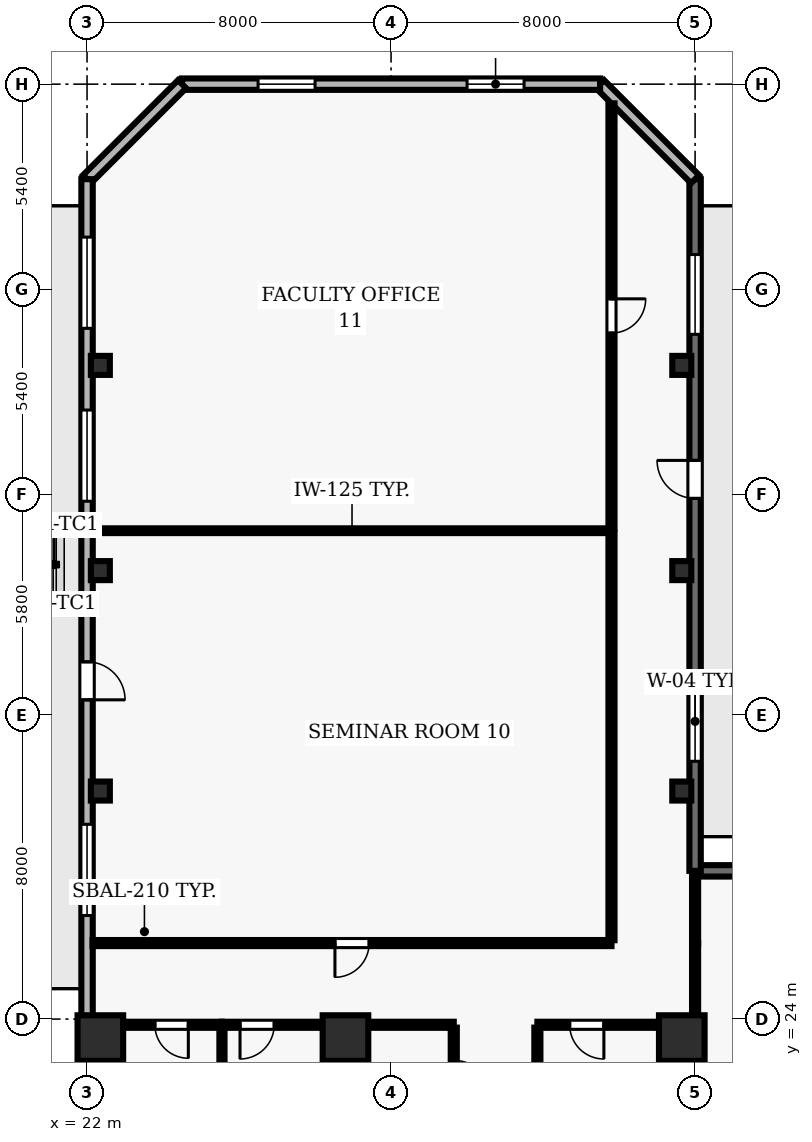
"""IFC4 building model, lengths in metres.
Left out: names, types, materials, properties, quantities, classifications, styles, units other than length and angle.
Written with IfcOpenShell. Run it as: python <this file> out.ifc"""

import sys

from ifc_helpers import new_model, si_unit, direction, frame, frame_2d, origin, origin_2d, place, context, subcontext, project, spatial, rectangle, hollow_rectangle, extrude, element, fill, save


model = new_model("IFC4")
c1 = context("Model", 3, precision=1e-05, world=origin(), true_north=direction((0.0, 1.0)))
c2 = subcontext(c1, "Body", "Model", "MODEL_VIEW")
j1 = project(units=[si_unit("LENGTHUNIT", "METRE"), si_unit("PLANEANGLEUNIT", "RADIAN")], contexts=[c1])
p1 = place(None, origin())
s1 = spatial("IfcSite", under=j1, at=p1, CompositionType="ELEMENT")
p2 = place(p1, origin())
s2 = spatial("IfcBuilding", under=s1, at=p2, CompositionType="ELEMENT")
p3 = place(p2, frame((0.0, 0.0, 130.7)))
s3 = spatial("IfcBuildingStorey", under=s2, at=p3, CompositionType="ELEMENT", Elevation=130.7)
for number, where, z_axis, x_axis in (
    (1, (22.35, 23.5, 0.0), (0.0, 0.0, 1.0), (1.0, 0.0, 0.0)),
    (2, (28.8, 23.5, 0.0), (0.0, 0.0, 1.0), (1.0, 0.0, 0.0)),
    (3, (37.65, 23.5, 0.0), (0.0, 0.0, 1.0), (1.0, 0.0, 0.0)),
):
    element("IfcColumn", number, at=place(p3, frame(where, z_axis=z_axis, x_axis=x_axis)), inside=s3, PredefinedType="COLUMN", context=c2, shape_type="SweptSolid", body=[
        extrude(rectangle(XDim=1.2, YDim=1.2, at=origin_2d()), origin(), (0.0, 0.0, 1.0), 3.9),
    ])
for number, where, z_axis, x_axis in (
    (4, (22.35, 30.0, 0.0), (0.0, 0.0, 1.0), (1.0, 0.0, 0.0)),
    (5, (37.65, 30.0, 0.0), (0.0, 0.0, 1.0), (1.0, 0.0, 0.0)),
    (6, (22.35, 35.8, 0.0), (0.0, 0.0, 1.0), (1.0, 0.0, 0.0)),
    (7, (37.65, 35.8, 0.0), (0.0, 0.0, 1.0), (1.0, 0.0, 0.0)),
    (8, (22.35, 41.2, 0.0), (0.0, 0.0, 1.0), (1.0, 0.0, 0.0)),
    (9, (37.65, 41.2, 0.0), (0.0, 0.0, 1.0), (1.0, 0.0, 0.0)),
):
    element("IfcColumn", number, at=place(p3, frame(where, z_axis=z_axis, x_axis=x_axis)), inside=s3, PredefinedType="COLUMN", context=c2, shape_type="SweptSolid", body=[
        extrude(hollow_rectangle(XDim=0.5, YDim=0.5, WallThickness=0.025, at=origin_2d()), origin(), (0.0, 0.0, 1.0), 3.9),
    ])
p4 = place(p3, frame((46.151, 27.9, 0.0), z_axis=(0.0, 0.0, 1.0), x_axis=(-1.0, 0.0, 0.0)))
e10 = element("IfcWall", 10, at=p4, inside=s3, PredefinedType="SOLIDWALL", context=c2, shape_type="SweptSolid", body=[
    extrude(rectangle(XDim=8.151, YDim=0.3, at=frame_2d((4.075, 0.0))), origin(), (0.0, 0.0, 1.0), 3.69),
])
p5 = place(p4, frame((3.176, 0.0, 0.9)))
e11 = element("IfcOpeningElement", 11, at=p5, cuts=e10, PredefinedType="OPENING", context=c2, shape_type="SweptSolid", body=[
    extrude(rectangle(XDim=1.8, YDim=1.6, at=frame_2d((0.9, 0.8))), frame((0.0, 0.16, 0.0), z_axis=(0.0, -1.0, 0.0), x_axis=(1.0, 0.0, 0.0)), (0.0, 0.0, 1.0), 0.32),
])
p6 = place(p3, frame((38.0, 27.9, 0.0), z_axis=(0.0, 0.0, 1.0), x_axis=(0.0, 1.0, 0.0)))
e12 = element("IfcWall", 12, at=p6, inside=s3, PredefinedType="SOLIDWALL", context=c2, shape_type="SweptSolid", body=[
    extrude(rectangle(XDim=18.2, YDim=0.3, at=frame_2d((9.1, 0.0))), origin(), (0.0, 0.0, 1.0), 3.69),
])
p7 = place(p6, frame((9.8, 0.0, 0.0)))
e13 = element("IfcOpeningElement", 13, at=p7, cuts=e12, PredefinedType="OPENING", context=c2, shape_type="SweptSolid", body=[
    extrude(rectangle(XDim=1.0, YDim=2.2, at=frame_2d((0.5, 1.1))), frame((0.0, 0.16, 0.0), z_axis=(0.0, -1.0, 0.0), x_axis=(1.0, 0.0, 0.0)), (0.0, 0.0, 1.0), 0.32),
])
p8 = place(p6, frame((2.883, 0.0, 0.9)))
e14 = element("IfcOpeningElement", 14, at=p8, cuts=e12, PredefinedType="OPENING", context=c2, shape_type="SweptSolid", body=[
    extrude(rectangle(XDim=2.1, YDim=1.6, at=frame_2d((1.05, 0.8))), frame((0.0, 0.16, 0.0), z_axis=(0.0, -1.0, 0.0), x_axis=(1.0, 0.0, 0.0)), (0.0, 0.0, 1.0), 0.32),
])
p9 = place(p6, frame((14.117, 0.0, 0.9)))
e15 = element("IfcOpeningElement", 15, at=p9, cuts=e12, PredefinedType="OPENING", context=c2, shape_type="SweptSolid", body=[
    extrude(rectangle(XDim=2.1, YDim=1.6, at=frame_2d((1.05, 0.8))), frame((0.0, 0.16, 0.0), z_axis=(0.0, -1.0, 0.0), x_axis=(1.0, 0.0, 0.0)), (0.0, 0.0, 1.0), 0.32),
])
p10 = place(p3, frame((38.0, 46.1, 0.0), z_axis=(0.0, 0.0, 1.0), x_axis=(-0.707106781187, 0.707106781187, 0.0)))
e16 = element("IfcWall", 16, at=p10, inside=s3, PredefinedType="SOLIDWALL", context=c2, shape_type="SweptSolid", body=[
    extrude(rectangle(XDim=3.536, YDim=0.3, at=frame_2d((1.768, 0.0))), origin(), (0.0, 0.0, 1.0), 3.69),
])
p11 = place(p3, frame((35.5, 48.6, 0.0), z_axis=(0.0, 0.0, 1.0), x_axis=(-1.0, 0.0, 0.0)))
e17 = element("IfcWall", 17, at=p11, inside=s3, PredefinedType="SOLIDWALL", context=c2, shape_type="SweptSolid", body=[
    extrude(rectangle(XDim=11.0, YDim=0.3, at=frame_2d((5.5, 0.0))), origin(), (0.0, 0.0, 1.0), 3.69),
])
p12 = place(p11, frame((2.0, 0.0, 0.9)))
e18 = element("IfcOpeningElement", 18, at=p12, cuts=e17, PredefinedType="OPENING", context=c2, shape_type="SweptSolid", body=[
    extrude(rectangle(XDim=1.5, YDim=1.8, at=frame_2d((0.75, 0.9))), frame((0.0, 0.16, 0.0), z_axis=(0.0, -1.0, 0.0), x_axis=(1.0, 0.0, 0.0)), (0.0, 0.0, 1.0), 0.32),
])
p13 = place(p11, frame((7.5, 0.0, 0.9)))
e19 = element("IfcOpeningElement", 19, at=p13, cuts=e17, PredefinedType="OPENING", context=c2, shape_type="SweptSolid", body=[
    extrude(rectangle(XDim=1.5, YDim=1.8, at=frame_2d((0.75, 0.9))), frame((0.0, 0.16, 0.0), z_axis=(0.0, -1.0, 0.0), x_axis=(1.0, 0.0, 0.0)), (0.0, 0.0, 1.0), 0.32),
])
p14 = place(p3, frame((24.5, 48.6, 0.0), z_axis=(0.0, 0.0, 1.0), x_axis=(-0.707106781187, -0.707106781187, 0.0)))
e20 = element("IfcWall", 20, at=p14, inside=s3, PredefinedType="SOLIDWALL", context=c2, shape_type="SweptSolid", body=[
    extrude(rectangle(XDim=3.536, YDim=0.3, at=frame_2d((1.768, 0.0))), origin(), (0.0, 0.0, 1.0), 3.69),
])
p15 = place(p3, frame((22.0, 46.1, 0.0), z_axis=(0.0, 0.0, 1.0), x_axis=(0.0, -1.0, 0.0)))
e21 = element("IfcWall", 21, at=p15, inside=s3, PredefinedType="SOLIDWALL", context=c2, shape_type="SweptSolid", body=[
    extrude(rectangle(XDim=43.6, YDim=0.3, at=frame_2d((21.8, 0.0))), origin(), (0.0, 0.0, 1.0), 3.69),
])
p16 = place(p15, frame((12.7, 0.0, 0.0)))
e22 = element("IfcOpeningElement", 22, at=p16, cuts=e21, PredefinedType="OPENING", context=c2, shape_type="SweptSolid", body=[
    extrude(rectangle(XDim=1.0, YDim=2.2, at=frame_2d((0.5, 1.1))), frame((0.0, 0.16, 0.0), z_axis=(0.0, -1.0, 0.0), x_axis=(1.0, 0.0, 0.0)), (0.0, 0.0, 1.0), 0.32),
])
p17 = place(p15, frame((1.525, 0.0, 0.9)))
e23 = element("IfcOpeningElement", 23, at=p17, cuts=e21, PredefinedType="OPENING", context=c2, shape_type="SweptSolid", body=[
    extrude(rectangle(XDim=2.4, YDim=1.8, at=frame_2d((1.2, 0.9))), frame((0.0, 0.16, 0.0), z_axis=(0.0, -1.0, 0.0), x_axis=(1.0, 0.0, 0.0)), (0.0, 0.0, 1.0), 0.32),
])
p18 = place(p15, frame((6.075, 0.0, 0.9)))
e24 = element("IfcOpeningElement", 24, at=p18, cuts=e21, PredefinedType="OPENING", context=c2, shape_type="SweptSolid", body=[
    extrude(rectangle(XDim=2.4, YDim=1.8, at=frame_2d((1.2, 0.9))), frame((0.0, 0.16, 0.0), z_axis=(0.0, -1.0, 0.0), x_axis=(1.0, 0.0, 0.0)), (0.0, 0.0, 1.0), 0.32),
])
p19 = place(p15, frame((16.975, 0.0, 0.9)))
e25 = element("IfcOpeningElement", 25, at=p19, cuts=e21, PredefinedType="OPENING", context=c2, shape_type="SweptSolid", body=[
    extrude(rectangle(XDim=2.4, YDim=1.8, at=frame_2d((1.2, 0.9))), frame((0.0, 0.16, 0.0), z_axis=(0.0, -1.0, 0.0), x_axis=(1.0, 0.0, 0.0)), (0.0, 0.0, 1.0), 0.32),
])
p20 = place(p15, frame((23.775, 0.0, 0.9)))
e26 = element("IfcOpeningElement", 26, at=p20, cuts=e21, PredefinedType="OPENING", context=c2, shape_type="SweptSolid", body=[
    extrude(rectangle(XDim=2.4, YDim=1.8, at=frame_2d((1.2, 0.9))), frame((0.0, 0.16, 0.0), z_axis=(0.0, -1.0, 0.0), x_axis=(1.0, 0.0, 0.0)), (0.0, 0.0, 1.0), 0.32),
])
p21 = place(p15, frame((27.875, 0.0, 0.9)))
e27 = element("IfcOpeningElement", 27, at=p21, cuts=e21, PredefinedType="OPENING", context=c2, shape_type="SweptSolid", body=[
    extrude(rectangle(XDim=2.4, YDim=1.8, at=frame_2d((1.2, 0.9))), frame((0.0, 0.16, 0.0), z_axis=(0.0, -1.0, 0.0), x_axis=(1.0, 0.0, 0.0)), (0.0, 0.0, 1.0), 0.32),
])
p22 = place(p15, frame((34.225, 0.0, 0.9)))
e28 = element("IfcOpeningElement", 28, at=p22, cuts=e21, PredefinedType="OPENING", context=c2, shape_type="SweptSolid", body=[
    extrude(rectangle(XDim=2.4, YDim=1.8, at=frame_2d((1.2, 0.9))), frame((0.0, 0.16, 0.0), z_axis=(0.0, -1.0, 0.0), x_axis=(1.0, 0.0, 0.0)), (0.0, 0.0, 1.0), 0.32),
])
p23 = place(p3, frame((25.55, 23.85, 0.0), z_axis=(0.0, 0.0, 1.0), x_axis=(-1.0, 0.0, 0.0)))
e29 = element("IfcWall", 29, at=p23, inside=s3, PredefinedType="PARTITIONING", context=c2, shape_type="SweptSolid", body=[
    extrude(rectangle(XDim=3.35, YDim=0.16, at=frame_2d((1.675, 0.0))), origin(), (0.0, 0.0, 1.0), 3.073),
])
p24 = place(p23, frame((0.885, 0.0, 0.0)))
e30 = element("IfcOpeningElement", 30, at=p24, cuts=e29, PredefinedType="OPENING", context=c2, shape_type="SweptSolid", body=[
    extrude(rectangle(XDim=0.88, YDim=2.1, at=frame_2d((0.44, 1.05))), frame((0.0, 0.09, 0.0), z_axis=(0.0, -1.0, 0.0), x_axis=(1.0, 0.0, 0.0)), (0.0, 0.0, 1.0), 0.18),
])
p25 = place(p3, frame((28.8, 23.85, 0.0), z_axis=(0.0, 0.0, 1.0), x_axis=(-1.0, 0.0, 0.0)))
e31 = element("IfcWall", 31, at=p25, inside=s3, PredefinedType="PARTITIONING", context=c2, shape_type="SweptSolid", body=[
    extrude(rectangle(XDim=3.25, YDim=0.16, at=frame_2d((1.625, 0.0))), origin(), (0.0, 0.0, 1.0), 3.073),
])
p26 = place(p25, frame((1.875, 0.0, 0.0)))
e32 = element("IfcOpeningElement", 32, at=p26, cuts=e31, PredefinedType="OPENING", context=c2, shape_type="SweptSolid", body=[
    extrude(rectangle(XDim=0.9, YDim=2.1, at=frame_2d((0.45, 1.05))), frame((0.0, 0.09, 0.0), z_axis=(0.0, -1.0, 0.0), x_axis=(1.0, 0.0, 0.0)), (0.0, 0.0, 1.0), 0.18),
])
p27 = place(p3, frame((31.65, 23.85, 0.0), z_axis=(0.0, 0.0, 1.0), x_axis=(-1.0, 0.0, 0.0)))
e33 = element("IfcWall", 33, at=p27, inside=s3, PredefinedType="PARTITIONING", context=c2, shape_type="SweptSolid", body=[
    extrude(rectangle(XDim=2.85, YDim=0.16, at=frame_2d((1.425, 0.0))), origin(), (0.0, 0.0, 1.0), 3.073),
])
p28 = place(p3, frame((35.8, 26.0, 0.0), z_axis=(0.0, 0.0, 1.0), x_axis=(-1.0, 0.0, 0.0)))
e34 = element("IfcWall", 34, at=p28, inside=s3, PredefinedType="PARTITIONING", context=c2, shape_type="SweptSolid", body=[
    extrude(rectangle(XDim=13.655, YDim=0.16, at=frame_2d((6.828, 0.0))), origin(), (0.0, 0.0, 1.0), 3.69),
])
p29 = place(p28, frame((6.377, 0.0, 0.0)))
e35 = element("IfcOpeningElement", 35, at=p29, cuts=e34, PredefinedType="OPENING", context=c2, shape_type="SweptSolid", body=[
    extrude(rectangle(XDim=0.9, YDim=2.1, at=frame_2d((0.45, 1.05))), frame((0.0, 0.09, 0.0), z_axis=(0.0, -1.0, 0.0), x_axis=(1.0, 0.0, 0.0)), (0.0, 0.0, 1.0), 0.18),
])
p30 = place(p3, frame((35.8, 36.85, 0.0), z_axis=(0.0, 0.0, 1.0), x_axis=(-1.0, 0.0, 0.0)))
e36 = element("IfcWall", 36, at=p30, inside=s3, PredefinedType="PARTITIONING", context=c2, shape_type="SweptSolid", body=[
    extrude(rectangle(XDim=13.655, YDim=0.125, at=frame_2d((6.828, 0.0))), origin(), (0.0, 0.0, 1.0), 3.69),
])
p31 = place(p3, frame((37.85, 23.85, 0.0), z_axis=(0.0, 0.0, 1.0), x_axis=(-1.0, 0.0, 0.0)))
e37 = element("IfcWall", 37, at=p31, inside=s3, PredefinedType="PARTITIONING", context=c2, shape_type="SweptSolid", body=[
    extrude(rectangle(XDim=4.0, YDim=0.16, at=frame_2d((2.0, 0.0))), origin(), (0.0, 0.0, 1.0), 3.073),
])
p32 = place(p31, frame((2.25, 0.0, 0.0)))
e38 = element("IfcOpeningElement", 38, at=p32, cuts=e37, PredefinedType="OPENING", context=c2, shape_type="SweptSolid", body=[
    extrude(rectangle(XDim=0.9, YDim=2.1, at=frame_2d((0.45, 1.05))), frame((0.0, 0.09, 0.0), z_axis=(0.0, -1.0, 0.0), x_axis=(1.0, 0.0, 0.0)), (0.0, 0.0, 1.0), 0.18),
])
p33 = place(p3, frame((25.55, 19.16, 0.0), z_axis=(0.0, 0.0, 1.0), x_axis=(0.0, 1.0, 0.0)))
e39 = element("IfcWall", 39, at=p33, inside=s3, PredefinedType="PARTITIONING", context=c2, shape_type="SweptSolid", body=[
    extrude(rectangle(XDim=4.615, YDim=0.135, at=frame_2d((2.308, 0.0))), origin(), (0.0, 0.0, 1.0), 3.69),
])
p34 = place(p3, frame((28.8, 23.775, 0.0), z_axis=(0.0, 0.0, 1.0), x_axis=(0.0, -1.0, 0.0)))
e40 = element("IfcWall", 40, at=p34, inside=s3, PredefinedType="PARTITIONING", context=c2, shape_type="SweptSolid", body=[
    extrude(rectangle(XDim=2.725, YDim=0.125, at=frame_2d((1.362, 0.0))), origin(), (0.0, 0.0, 1.0), 3.69),
])
p35 = place(p3, frame((31.65, 23.775, 0.0), z_axis=(0.0, 0.0, 1.0), x_axis=(0.0, -1.0, 0.0)))
e41 = element("IfcWall", 41, at=p35, inside=s3, PredefinedType="PARTITIONING", context=c2, shape_type="SweptSolid", body=[
    extrude(rectangle(XDim=2.725, YDim=0.16, at=frame_2d((1.362, 0.0))), origin(), (0.0, 0.0, 1.0), 3.69),
])
p36 = place(p35, frame((0.862, 0.0, 0.0)))
e42 = element("IfcOpeningElement", 42, at=p36, cuts=e41, PredefinedType="OPENING", context=c2, shape_type="SweptSolid", body=[
    extrude(rectangle(XDim=1.0, YDim=2.1, at=frame_2d((0.5, 1.05))), frame((0.0, 0.09, 0.0), z_axis=(0.0, -1.0, 0.0), x_axis=(1.0, 0.0, 0.0)), (0.0, 0.0, 1.0), 0.18),
])
p37 = place(p3, frame((33.85, 21.025, 0.0), z_axis=(0.0, 0.0, 1.0), x_axis=(0.0, 1.0, 0.0)))
e43 = element("IfcWall", 43, at=p37, inside=s3, PredefinedType="PARTITIONING", context=c2, shape_type="SweptSolid", body=[
    extrude(rectangle(XDim=2.75, YDim=0.16, at=frame_2d((1.375, 0.0))), origin(), (0.0, 0.0, 1.0), 3.69),
])
p38 = place(p3, frame((35.8, 36.793, 0.0), z_axis=(0.0, 0.0, 1.0), x_axis=(0.0, -1.0, 0.0)))
e44 = element("IfcWall", 44, at=p38, inside=s3, PredefinedType="PARTITIONING", context=c2, shape_type="SweptSolid", body=[
    extrude(rectangle(XDim=10.718, YDim=0.16, at=frame_2d((5.359, 0.0))), origin(), (0.0, 0.0, 1.0), 3.69),
])
p39 = place(p3, frame((35.8, 48.095, 0.0), z_axis=(0.0, 0.0, 1.0), x_axis=(0.0, -1.0, 0.0)))
e45 = element("IfcWall", 45, at=p39, inside=s3, PredefinedType="PARTITIONING", context=c2, shape_type="SweptSolid", body=[
    extrude(rectangle(XDim=11.188, YDim=0.16, at=frame_2d((5.594, 0.0))), origin(), (0.0, 0.0, 1.0), 3.69),
])
p40 = place(p39, frame((5.144, 0.0, 0.0)))
e46 = element("IfcOpeningElement", 46, at=p40, cuts=e45, PredefinedType="OPENING", context=c2, shape_type="SweptSolid", body=[
    extrude(rectangle(XDim=0.9, YDim=2.1, at=frame_2d((0.45, 1.05))), frame((0.0, 0.09, 0.0), z_axis=(0.0, -1.0, 0.0), x_axis=(1.0, 0.0, 0.0)), (0.0, 0.0, 1.0), 0.18),
])
p41 = place(p3, frame((37.85, 21.0, 0.0), z_axis=(0.0, 0.0, 1.0), x_axis=(0.0, 1.0, 0.0)))
e47 = element("IfcWall", 47, at=p41, inside=s3, PredefinedType="MOVABLE", context=c2, shape_type="SweptSolid", body=[
    extrude(rectangle(XDim=2.775, YDim=0.11, at=frame_2d((1.387, 0.0))), origin(), (0.0, 0.0, 1.0), 3.073),
])
p42 = place(p3, frame((38.0, 23.85, 0.0), z_axis=(0.0, 0.0, 1.0), x_axis=(0.0, 1.0, 0.0)))
e48 = element("IfcWall", 48, at=p42, inside=s3, PredefinedType="PARTITIONING", context=c2, shape_type="SweptSolid", body=[
    extrude(rectangle(XDim=2.15, YDim=0.16, at=frame_2d((1.075, 0.0))), origin(), (0.0, 0.0, 1.0), 3.073),
])
p43 = place(p3, frame((38.0, 26.0, 0.0), z_axis=(0.0, 0.0, 1.0), x_axis=(0.0, 1.0, 0.0)))
e49 = element("IfcWall", 49, at=p43, inside=s3, PredefinedType="PARTITIONING", context=c2, shape_type="SweptSolid", body=[
    extrude(rectangle(XDim=1.755, YDim=0.16, at=frame_2d((0.877, 0.0))), origin(), (0.0, 0.0, 1.0), 3.073),
])
p44 = place(p3, frame((38.05, 23.85, 0.0), z_axis=(0.0, 0.0, 1.0), x_axis=(0.0, -1.0, 0.0)))
e50 = element("IfcWall", 50, at=p44, inside=s3, PredefinedType="PARTITIONING", context=c2, shape_type="SweptSolid", body=[
    extrude(rectangle(XDim=7.775, YDim=0.125, at=frame_2d((3.888, 0.0))), origin(), (0.0, 0.0, 1.0), 3.073),
])
p45 = place(p7, origin())
e51 = element("IfcDoor", 51, at=p45, inside=s3, OperationType="SINGLE_SWING_RIGHT", PredefinedType="DOOR", context=c2, shape_type="SweptSolid", body=[
    extrude(rectangle(XDim=1.0, YDim=2.2, at=frame_2d((0.5, 1.1))), frame((0.0, 0.025, 0.0), z_axis=(0.0, -1.0, 0.0), x_axis=(1.0, 0.0, 0.0)), (0.0, 0.0, 1.0), 0.05),
])
fill(e13, e51)
p46 = place(p8, origin())
e52 = element("IfcWindow", 52, at=p46, inside=s3, PartitioningType="SINGLE_PANEL", PredefinedType="WINDOW", context=c2, shape_type="SweptSolid", body=[
    extrude(rectangle(XDim=2.1, YDim=1.6, at=frame_2d((1.05, 0.8))), frame((0.0, 0.03, 0.0), z_axis=(0.0, -1.0, 0.0), x_axis=(1.0, 0.0, 0.0)), (0.0, 0.0, 1.0), 0.06),
])
fill(e14, e52)
p47 = place(p9, origin())
e53 = element("IfcWindow", 53, at=p47, inside=s3, PartitioningType="SINGLE_PANEL", PredefinedType="WINDOW", context=c2, shape_type="SweptSolid", body=[
    extrude(rectangle(XDim=2.1, YDim=1.6, at=frame_2d((1.05, 0.8))), frame((0.0, 0.03, 0.0), z_axis=(0.0, -1.0, 0.0), x_axis=(1.0, 0.0, 0.0)), (0.0, 0.0, 1.0), 0.06),
])
fill(e15, e53)
p48 = place(p12, origin())
e54 = element("IfcWindow", 54, at=p48, inside=s3, PartitioningType="SINGLE_PANEL", PredefinedType="WINDOW", context=c2, shape_type="SweptSolid", body=[
    extrude(rectangle(XDim=1.5, YDim=1.8, at=frame_2d((0.75, 0.9))), frame((0.0, 0.03, 0.0), z_axis=(0.0, -1.0, 0.0), x_axis=(1.0, 0.0, 0.0)), (0.0, 0.0, 1.0), 0.06),
])
fill(e18, e54)
p49 = place(p13, origin())
e55 = element("IfcWindow", 55, at=p49, inside=s3, PartitioningType="SINGLE_PANEL", PredefinedType="WINDOW", context=c2, shape_type="SweptSolid", body=[
    extrude(rectangle(XDim=1.5, YDim=1.8, at=frame_2d((0.75, 0.9))), frame((0.0, 0.03, 0.0), z_axis=(0.0, -1.0, 0.0), x_axis=(1.0, 0.0, 0.0)), (0.0, 0.0, 1.0), 0.06),
])
fill(e19, e55)
p50 = place(p16, origin())
e56 = element("IfcDoor", 56, at=p50, inside=s3, OperationType="SINGLE_SWING_RIGHT", PredefinedType="DOOR", context=c2, shape_type="SweptSolid", body=[
    extrude(rectangle(XDim=1.0, YDim=2.2, at=frame_2d((0.5, 1.1))), frame((0.0, 0.025, 0.0), z_axis=(0.0, -1.0, 0.0), x_axis=(1.0, 0.0, 0.0)), (0.0, 0.0, 1.0), 0.05),
])
fill(e22, e56)
p51 = place(p17, origin())
e57 = element("IfcWindow", 57, at=p51, inside=s3, PartitioningType="SINGLE_PANEL", PredefinedType="WINDOW", context=c2, shape_type="SweptSolid", body=[
    extrude(rectangle(XDim=2.4, YDim=1.8, at=frame_2d((1.2, 0.9))), frame((0.0, 0.03, 0.0), z_axis=(0.0, -1.0, 0.0), x_axis=(1.0, 0.0, 0.0)), (0.0, 0.0, 1.0), 0.06),
])
fill(e23, e57)
p52 = place(p18, origin())
e58 = element("IfcWindow", 58, at=p52, inside=s3, PartitioningType="SINGLE_PANEL", PredefinedType="WINDOW", context=c2, shape_type="SweptSolid", body=[
    extrude(rectangle(XDim=2.4, YDim=1.8, at=frame_2d((1.2, 0.9))), frame((0.0, 0.03, 0.0), z_axis=(0.0, -1.0, 0.0), x_axis=(1.0, 0.0, 0.0)), (0.0, 0.0, 1.0), 0.06),
])
fill(e24, e58)
p53 = place(p19, origin())
e59 = element("IfcWindow", 59, at=p53, inside=s3, PartitioningType="SINGLE_PANEL", PredefinedType="WINDOW", context=c2, shape_type="SweptSolid", body=[
    extrude(rectangle(XDim=2.4, YDim=1.8, at=frame_2d((1.2, 0.9))), frame((0.0, 0.03, 0.0), z_axis=(0.0, -1.0, 0.0), x_axis=(1.0, 0.0, 0.0)), (0.0, 0.0, 1.0), 0.06),
])
fill(e25, e59)
p54 = place(p32, origin())
e60 = element("IfcDoor", 60, at=p54, inside=s3, OperationType="SINGLE_SWING_LEFT", PredefinedType="DOOR", context=c2, shape_type="SweptSolid", body=[
    extrude(rectangle(XDim=0.9, YDim=2.1, at=frame_2d((0.45, 1.05))), frame((0.0, 0.025, 0.0), z_axis=(0.0, -1.0, 0.0), x_axis=(1.0, 0.0, 0.0)), (0.0, 0.0, 1.0), 0.05),
])
fill(e38, e60)
p55 = place(p36, origin())
e61 = element("IfcDoor", 61, at=p55, inside=s3, OperationType="SINGLE_SWING_RIGHT", PredefinedType="DOOR", context=c2, shape_type="SweptSolid", body=[
    extrude(rectangle(XDim=1.0, YDim=2.1, at=frame_2d((0.5, 1.05))), frame((0.0, 0.025, 0.0), z_axis=(0.0, -1.0, 0.0), x_axis=(1.0, 0.0, 0.0)), (0.0, 0.0, 1.0), 0.05),
])
fill(e42, e61)
p56 = place(p24, origin())
e62 = element("IfcDoor", 62, at=p56, inside=s3, OperationType="SINGLE_SWING_LEFT", PredefinedType="DOOR", context=c2, shape_type="SweptSolid", body=[
    extrude(rectangle(XDim=0.88, YDim=2.1, at=frame_2d((0.44, 1.05))), frame((0.0, 0.025, 0.0), z_axis=(0.0, -1.0, 0.0), x_axis=(1.0, 0.0, 0.0)), (0.0, 0.0, 1.0), 0.05),
])
fill(e30, e62)
p57 = place(p26, origin())
e63 = element("IfcDoor", 63, at=p57, inside=s3, OperationType="SINGLE_SWING_RIGHT", PredefinedType="DOOR", context=c2, shape_type="SweptSolid", body=[
    extrude(rectangle(XDim=0.9, YDim=2.1, at=frame_2d((0.45, 1.05))), frame((0.0, 0.025, 0.0), z_axis=(0.0, -1.0, 0.0), x_axis=(1.0, 0.0, 0.0)), (0.0, 0.0, 1.0), 0.05),
])
fill(e32, e63)
p58 = place(p29, origin())
e64 = element("IfcDoor", 64, at=p58, inside=s3, OperationType="SINGLE_SWING_RIGHT", PredefinedType="DOOR", context=c2, shape_type="SweptSolid", body=[
    extrude(rectangle(XDim=0.9, YDim=2.1, at=frame_2d((0.45, 1.05))), frame((0.0, 0.025, 0.0), z_axis=(0.0, -1.0, 0.0), x_axis=(1.0, 0.0, 0.0)), (0.0, 0.0, 1.0), 0.05),
])
fill(e35, e64)
p59 = place(p40, origin())
e65 = element("IfcDoor", 65, at=p59, inside=s3, OperationType="SINGLE_SWING_LEFT", PredefinedType="DOOR", context=c2, shape_type="SweptSolid", body=[
    extrude(rectangle(XDim=0.9, YDim=2.1, at=frame_2d((0.45, 1.05))), frame((0.0, 0.025, 0.0), z_axis=(0.0, -1.0, 0.0), x_axis=(1.0, 0.0, 0.0)), (0.0, 0.0, 1.0), 0.05),
])
fill(e46, e65)
save(model, sys.argv[1])
